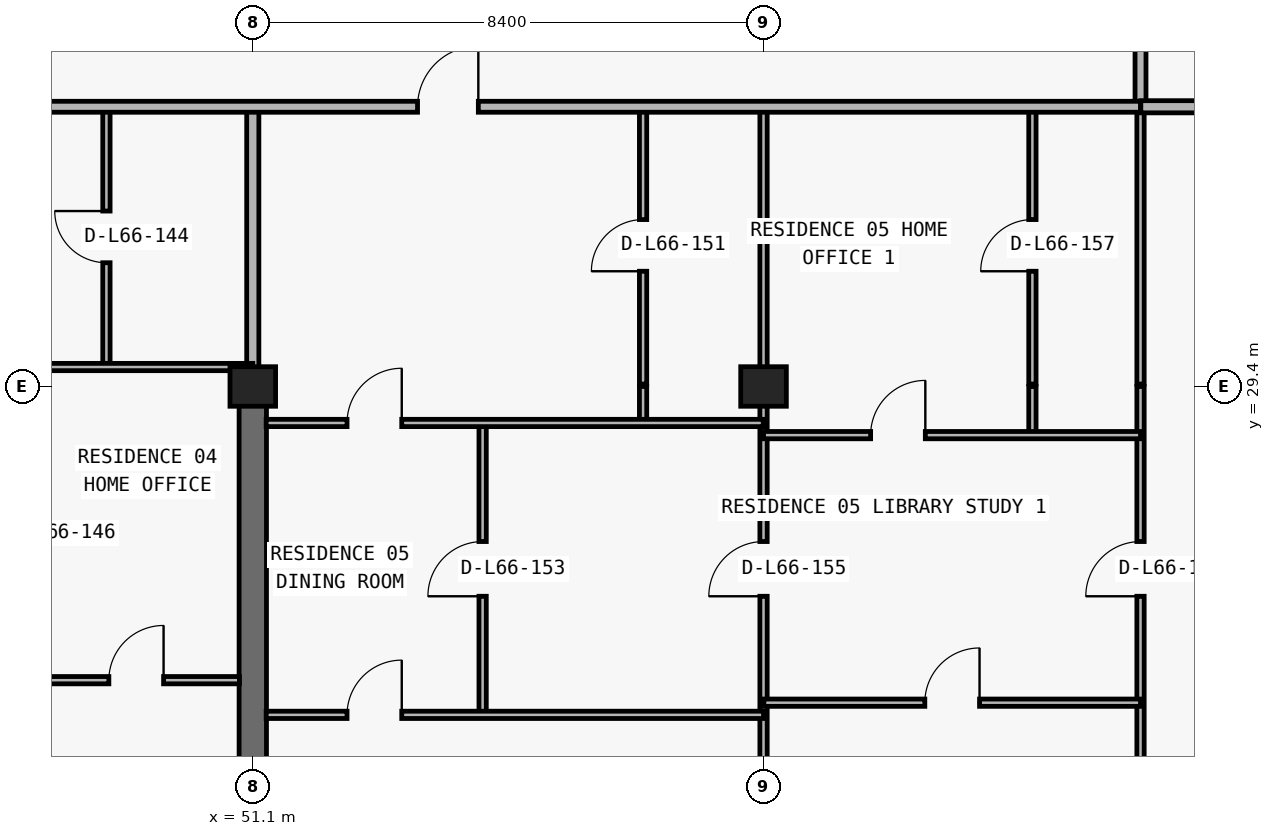
"""IFC4 building model, lengths in metres.
Left out: names, types, materials, properties, quantities, classifications, styles, units other than length and angle.
Written with IfcOpenShell. Run it as: python <this file> out.ifc"""

import sys

from ifc_helpers import new_model, si_unit, direction, frame, frame_2d, origin, origin_2d, place, context, subcontext, project, spatial, rectangle, extrude, element, fill, save


model = new_model("IFC4")
c1 = context("Model", 3, precision=1e-05, world=origin(), true_north=direction((0.0, 1.0)))
c2 = subcontext(c1, "Body", "Model", "MODEL_VIEW")
j1 = project(units=[si_unit("LENGTHUNIT", "METRE"), si_unit("PLANEANGLEUNIT", "RADIAN")], contexts=[c1])
p1 = place(None, origin())
s1 = spatial("IfcSite", under=j1, at=p1, CompositionType="ELEMENT")
p2 = place(p1, origin())
s2 = spatial("IfcBuilding", under=s1, at=p2, CompositionType="ELEMENT")
p3 = place(p2, frame((0.0, 0.0, 236.4)))
s3 = spatial("IfcBuildingStorey", under=s2, at=p3, CompositionType="ELEMENT", Elevation=236.4)
for number, where, z_axis, x_axis in (
    (1, (51.1, 29.4, 0.0), (0.0, 0.0, 1.0), (1.0, 0.0, 0.0)),
    (2, (59.5, 29.4, 0.0), (0.0, 0.0, 1.0), (1.0, 0.0, 0.0)),
):
    element("IfcColumn", number, at=place(p3, frame(where, z_axis=z_axis, x_axis=x_axis)), inside=s3, PredefinedType="COLUMN", context=c2, shape_type="SweptSolid", body=[
        extrude(rectangle(XDim=0.75, YDim=0.65, at=origin_2d()), origin(), (0.0, 0.0, 1.0), 3.05),
    ])
p4 = place(p3, frame((51.1, 20.8, 0.0), z_axis=(0.0, 0.0, 1.0), x_axis=(0.0, 1.0, 0.0)))
e3 = element("IfcWall", 3, at=p4, inside=s3, PredefinedType="SHEAR", context=c2, shape_type="SweptSolid", body=[
    extrude(rectangle(XDim=8.6, YDim=0.45, at=frame_2d((4.3, 0.0))), origin(), (0.0, 0.0, 1.0), 3.05),
])
p5 = place(p3, frame((48.693, 29.72, 0.0), z_axis=(0.0, 0.0, 1.0), x_axis=(0.0, 1.0, 0.0)))
e4 = element("IfcWall", 4, at=p5, inside=s3, PredefinedType="PARTITIONING", context=c2, shape_type="SweptSolid", body=[
    extrude(rectangle(XDim=4.28, YDim=0.12, at=frame_2d((2.14, 0.0))), origin(), (0.0, 0.0, 1.0), 3.05),
])
p6 = place(p5, frame((1.715, 0.0, 0.0)))
e5 = element("IfcOpeningElement", 5, at=p6, cuts=e4, PredefinedType="OPENING", context=c2, shape_type="SweptSolid", body=[
    extrude(rectangle(XDim=0.85, YDim=2.1, at=frame_2d((0.425, 1.05))), frame((0.0, 0.07, 0.0), z_axis=(0.0, -1.0, 0.0), x_axis=(1.0, 0.0, 0.0)), (0.0, 0.0, 1.0), 0.14),
])
p7 = place(p3, frame((51.1, 29.44, 0.0), z_axis=(0.0, 0.0, 1.0), x_axis=(0.0, 1.0, 0.0)))
e6 = element("IfcWall", 6, at=p7, inside=s3, PredefinedType="PARTITIONING", context=c2, shape_type="SweptSolid", body=[
    extrude(rectangle(XDim=4.56, YDim=0.2, at=frame_2d((2.28, 0.0))), origin(), (0.0, 0.0, 1.0), 2.335),
])
p8 = place(p3, frame((54.88, 24.0, 0.0), z_axis=(0.0, 0.0, 1.0), x_axis=(0.0, 1.0, 0.0)))
e7 = element("IfcWall", 7, at=p8, inside=s3, PredefinedType="PARTITIONING", context=c2, shape_type="SweptSolid", body=[
    extrude(rectangle(XDim=4.8, YDim=0.12, at=frame_2d((2.4, 0.0))), origin(), (0.0, 0.0, 1.0), 3.05),
])
p9 = place(p8, frame((1.95, 0.0, 0.0)))
e8 = element("IfcOpeningElement", 8, at=p9, cuts=e7, PredefinedType="OPENING", context=c2, shape_type="SweptSolid", body=[
    extrude(rectangle(XDim=0.9, YDim=2.15, at=frame_2d((0.45, 1.075))), frame((0.0, 0.07, 0.0), z_axis=(0.0, -1.0, 0.0), x_axis=(1.0, 0.0, 0.0)), (0.0, 0.0, 1.0), 0.14),
])
p10 = place(p3, frame((57.519, 28.8, 0.0), z_axis=(0.0, 0.0, 1.0), x_axis=(0.0, 1.0, 0.0)))
e9 = element("IfcWall", 9, at=p10, inside=s3, PredefinedType="PARTITIONING", context=c2, shape_type="SweptSolid", body=[
    extrude(rectangle(XDim=0.6, YDim=0.12, at=frame_2d((0.3, 0.0))), origin(), (0.0, 0.0, 1.0), 3.05),
])
p11 = place(p3, frame((57.519, 29.44, 0.0), z_axis=(0.0, 0.0, 1.0), x_axis=(0.0, 1.0, 0.0)))
e10 = element("IfcWall", 10, at=p11, inside=s3, PredefinedType="PARTITIONING", context=c2, shape_type="SweptSolid", body=[
    extrude(rectangle(XDim=4.56, YDim=0.12, at=frame_2d((2.28, 0.0))), origin(), (0.0, 0.0, 1.0), 3.05),
])
p12 = place(p11, frame((1.855, 0.0, 0.0)))
e11 = element("IfcOpeningElement", 11, at=p12, cuts=e10, PredefinedType="OPENING", context=c2, shape_type="SweptSolid", body=[
    extrude(rectangle(XDim=0.85, YDim=2.1, at=frame_2d((0.425, 1.05))), frame((0.0, 0.07, 0.0), z_axis=(0.0, -1.0, 0.0), x_axis=(1.0, 0.0, 0.0)), (0.0, 0.0, 1.0), 0.14),
])
p13 = place(p3, frame((59.5, 13.34, 0.0), z_axis=(0.0, 0.0, 1.0), x_axis=(0.0, 1.0, 0.0)))
e12 = element("IfcWall", 12, at=p13, inside=s3, PredefinedType="PARTITIONING", context=c2, shape_type="SweptSolid", body=[
    extrude(rectangle(XDim=16.06, YDim=0.12, at=frame_2d((8.03, 0.0))), origin(), (0.0, 0.0, 1.0), 2.263),
])
p14 = place(p13, frame((12.61, 0.0, 0.0)))
e13 = element("IfcOpeningElement", 13, at=p14, cuts=e12, PredefinedType="OPENING", context=c2, shape_type="SweptSolid", body=[
    extrude(rectangle(XDim=0.9, YDim=2.15, at=frame_2d((0.45, 1.075))), frame((0.0, 0.07, 0.0), z_axis=(0.0, -1.0, 0.0), x_axis=(1.0, 0.0, 0.0)), (0.0, 0.0, 1.0), 0.14),
])
p15 = place(p3, frame((59.5, 29.44, 0.0), z_axis=(0.0, 0.0, 1.0), x_axis=(0.0, 1.0, 0.0)))
e14 = element("IfcWall", 14, at=p15, inside=s3, PredefinedType="PARTITIONING", context=c2, shape_type="SweptSolid", body=[
    extrude(rectangle(XDim=4.56, YDim=0.12, at=frame_2d((2.28, 0.0))), origin(), (0.0, 0.0, 1.0), 2.263),
])
p16 = place(p3, frame((63.922, 28.6, 0.0), z_axis=(0.0, 0.0, 1.0), x_axis=(0.0, 1.0, 0.0)))
e15 = element("IfcWall", 15, at=p16, inside=s3, PredefinedType="PARTITIONING", context=c2, shape_type="SweptSolid", body=[
    extrude(rectangle(XDim=0.8, YDim=0.12, at=frame_2d((0.4, 0.0))), origin(), (0.0, 0.0, 1.0), 3.05),
])
p17 = place(p3, frame((63.922, 29.44, 0.0), z_axis=(0.0, 0.0, 1.0), x_axis=(0.0, 1.0, 0.0)))
e16 = element("IfcWall", 16, at=p17, inside=s3, PredefinedType="PARTITIONING", context=c2, shape_type="SweptSolid", body=[
    extrude(rectangle(XDim=4.56, YDim=0.12, at=frame_2d((2.28, 0.0))), origin(), (0.0, 0.0, 1.0), 3.05),
])
p18 = place(p17, frame((1.855, 0.0, 0.0)))
e17 = element("IfcOpeningElement", 17, at=p18, cuts=e16, PredefinedType="OPENING", context=c2, shape_type="SweptSolid", body=[
    extrude(rectangle(XDim=0.85, YDim=2.1, at=frame_2d((0.425, 1.05))), frame((0.0, 0.07, 0.0), z_axis=(0.0, -1.0, 0.0), x_axis=(1.0, 0.0, 0.0)), (0.0, 0.0, 1.0), 0.14),
])
p19 = place(p3, frame((65.7, 13.42, 0.0), z_axis=(0.0, 0.0, 1.0), x_axis=(0.0, 1.0, 0.0)))
e18 = element("IfcWall", 18, at=p19, inside=s3, PredefinedType="PARTITIONING", context=c2, shape_type="SweptSolid", body=[
    extrude(rectangle(XDim=15.98, YDim=0.12, at=frame_2d((7.99, 0.0))), origin(), (0.0, 0.0, 1.0), 2.629),
])
p20 = place(p19, frame((12.53, 0.0, 0.0)))
e19 = element("IfcOpeningElement", 19, at=p20, cuts=e18, PredefinedType="OPENING", context=c2, shape_type="SweptSolid", body=[
    extrude(rectangle(XDim=0.9, YDim=2.15, at=frame_2d((0.45, 1.075))), frame((0.0, 0.07, 0.0), z_axis=(0.0, -1.0, 0.0), x_axis=(1.0, 0.0, 0.0)), (0.0, 0.0, 1.0), 0.14),
])
p21 = place(p3, frame((65.7, 29.44, 0.0), z_axis=(0.0, 0.0, 1.0), x_axis=(0.0, 1.0, 0.0)))
e20 = element("IfcWall", 20, at=p21, inside=s3, PredefinedType="PARTITIONING", context=c2, shape_type="SweptSolid", body=[
    extrude(rectangle(XDim=4.56, YDim=0.12, at=frame_2d((2.28, 0.0))), origin(), (0.0, 0.0, 1.0), 2.629),
])
p22 = place(p3, frame((65.7, 34.005, 0.0), z_axis=(0.0, 0.0, 1.0), x_axis=(0.0, 1.0, 0.0)))
e21 = element("IfcWall", 21, at=p22, inside=s3, PredefinedType="PARTITIONING", context=c2, shape_type="SweptSolid", body=[
    extrude(rectangle(XDim=2.995, YDim=0.18, at=frame_2d((1.498, 0.0))), origin(), (0.0, 0.0, 1.0), 2.629),
])
p23 = place(p3, frame((51.32, 24.0, 0.0), z_axis=(0.0, 0.0, 1.0), x_axis=(1.0, 0.0, 0.0)))
e22 = element("IfcWall", 22, at=p23, inside=s3, PredefinedType="PARTITIONING", context=c2, shape_type="SweptSolid", body=[
    extrude(rectangle(XDim=8.18, YDim=0.12, at=frame_2d((4.09, 0.0))), origin(), (0.0, 0.0, 1.0), 3.05),
])
p24 = place(p23, frame((1.33, 0.0, 0.0)))
e23 = element("IfcOpeningElement", 23, at=p24, cuts=e22, PredefinedType="OPENING", context=c2, shape_type="SweptSolid", body=[
    extrude(rectangle(XDim=0.9, YDim=2.15, at=frame_2d((0.45, 1.075))), frame((0.0, 0.07, 0.0), z_axis=(0.0, -1.0, 0.0), x_axis=(1.0, 0.0, 0.0)), (0.0, 0.0, 1.0), 0.14),
])
p25 = place(p3, frame((59.505, 24.2, 0.0), z_axis=(0.0, 0.0, 1.0), x_axis=(1.0, 0.0, 0.0)))
e24 = element("IfcWall", 24, at=p25, inside=s3, PredefinedType="PARTITIONING", context=c2, shape_type="SweptSolid", body=[
    extrude(rectangle(XDim=6.195, YDim=0.12, at=frame_2d((3.098, 0.0))), origin(), (0.0, 0.0, 1.0), 3.05),
])
p26 = place(p25, frame((2.647, 0.0, 0.0)))
e25 = element("IfcOpeningElement", 25, at=p26, cuts=e24, PredefinedType="OPENING", context=c2, shape_type="SweptSolid", body=[
    extrude(rectangle(XDim=0.9, YDim=2.15, at=frame_2d((0.45, 1.075))), frame((0.0, 0.07, 0.0), z_axis=(0.0, -1.0, 0.0), x_axis=(1.0, 0.0, 0.0)), (0.0, 0.0, 1.0), 0.14),
])
p27 = place(p3, frame((42.7, 24.57, 0.0), z_axis=(0.0, 0.0, 1.0), x_axis=(1.0, 0.0, 0.0)))
e26 = element("IfcWall", 26, at=p27, inside=s3, PredefinedType="PARTITIONING", context=c2, shape_type="SweptSolid", body=[
    extrude(rectangle(XDim=8.18, YDim=0.12, at=frame_2d((4.09, 0.0))), origin(), (0.0, 0.0, 1.0), 3.05),
])
p28 = place(p27, frame((1.86, 0.0, 0.0)))
e27 = element("IfcOpeningElement", 27, at=p28, cuts=e26, PredefinedType="OPENING", context=c2, shape_type="SweptSolid", body=[
    extrude(rectangle(XDim=0.9, YDim=2.15, at=frame_2d((0.45, 1.075))), frame((0.0, 0.07, 0.0), z_axis=(0.0, -1.0, 0.0), x_axis=(1.0, 0.0, 0.0)), (0.0, 0.0, 1.0), 0.14),
])
p29 = place(p27, frame((6.033, 0.0, 0.0)))
e28 = element("IfcOpeningElement", 28, at=p29, cuts=e26, PredefinedType="OPENING", context=c2, shape_type="SweptSolid", body=[
    extrude(rectangle(XDim=0.9, YDim=2.15, at=frame_2d((0.45, 1.075))), frame((0.0, 0.07, 0.0), z_axis=(0.0, -1.0, 0.0), x_axis=(1.0, 0.0, 0.0)), (0.0, 0.0, 1.0), 0.14),
])
p30 = place(p3, frame((59.5, 28.6, 0.0), z_axis=(0.0, 0.0, 1.0), x_axis=(1.0, 0.0, 0.0)))
e29 = element("IfcWall", 29, at=p30, inside=s3, PredefinedType="PARTITIONING", context=c2, shape_type="SweptSolid", body=[
    extrude(rectangle(XDim=6.2, YDim=0.12, at=frame_2d((3.1, 0.0))), origin(), (0.0, 0.0, 1.0), 3.05),
])
p31 = place(p30, frame((1.761, 0.0, 0.0)))
e30 = element("IfcOpeningElement", 30, at=p31, cuts=e29, PredefinedType="OPENING", context=c2, shape_type="SweptSolid", body=[
    extrude(rectangle(XDim=0.9, YDim=2.15, at=frame_2d((0.45, 1.075))), frame((0.0, 0.07, 0.0), z_axis=(0.0, -1.0, 0.0), x_axis=(1.0, 0.0, 0.0)), (0.0, 0.0, 1.0), 0.14),
])
p32 = place(p3, frame((51.32, 28.8, 0.0), z_axis=(0.0, 0.0, 1.0), x_axis=(1.0, 0.0, 0.0)))
e31 = element("IfcWall", 31, at=p32, inside=s3, PredefinedType="PARTITIONING", context=c2, shape_type="SweptSolid", body=[
    extrude(rectangle(XDim=8.175, YDim=0.12, at=frame_2d((4.087, 0.0))), origin(), (0.0, 0.0, 1.0), 3.05),
])
p33 = place(p32, frame((1.33, 0.0, 0.0)))
e32 = element("IfcOpeningElement", 32, at=p33, cuts=e31, PredefinedType="OPENING", context=c2, shape_type="SweptSolid", body=[
    extrude(rectangle(XDim=0.9, YDim=2.15, at=frame_2d((0.45, 1.075))), frame((0.0, 0.07, 0.0), z_axis=(0.0, -1.0, 0.0), x_axis=(1.0, 0.0, 0.0)), (0.0, 0.0, 1.0), 0.14),
])
p34 = place(p3, frame((42.7, 29.72, 0.0), z_axis=(0.0, 0.0, 1.0), x_axis=(1.0, 0.0, 0.0)))
e33 = element("IfcWall", 33, at=p34, inside=s3, PredefinedType="PARTITIONING", context=c2, shape_type="SweptSolid", body=[
    extrude(rectangle(XDim=8.4, YDim=0.12, at=frame_2d((4.2, 0.0))), origin(), (0.0, 0.0, 1.0), 2.263),
])
p35 = place(p34, frame((1.943, 0.0, 0.0)))
e34 = element("IfcOpeningElement", 34, at=p35, cuts=e33, PredefinedType="OPENING", context=c2, shape_type="SweptSolid", body=[
    extrude(rectangle(XDim=0.9, YDim=2.15, at=frame_2d((0.45, 1.075))), frame((0.0, 0.07, 0.0), z_axis=(0.0, -1.0, 0.0), x_axis=(1.0, 0.0, 0.0)), (0.0, 0.0, 1.0), 0.14),
])
p36 = place(p3, frame((12.105, 34.0, 0.0), z_axis=(0.0, 0.0, 1.0), x_axis=(1.0, 0.0, 0.0)))
e35 = element("IfcWall", 35, at=p36, inside=s3, PredefinedType="PARTITIONING", context=c2, shape_type="SweptSolid", body=[
    extrude(rectangle(XDim=53.595, YDim=0.18, at=frame_2d((26.797, 0.0))), origin(), (0.0, 0.0, 1.0), 3.05),
])
p37 = place(p36, frame((1.607, 0.0, 0.0)))
e36 = element("IfcOpeningElement", 36, at=p37, cuts=e35, PredefinedType="OPENING", context=c2, shape_type="SweptSolid", body=[
    extrude(rectangle(XDim=1.0, YDim=2.2, at=frame_2d((0.5, 1.1))), frame((0.0, 0.1, 0.0), z_axis=(0.0, -1.0, 0.0), x_axis=(1.0, 0.0, 0.0)), (0.0, 0.0, 1.0), 0.2),
])
p38 = place(p36, frame((17.057, 0.0, 0.0)))
e37 = element("IfcOpeningElement", 37, at=p38, cuts=e35, PredefinedType="OPENING", context=c2, shape_type="SweptSolid", body=[
    extrude(rectangle(XDim=1.0, YDim=2.2, at=frame_2d((0.5, 1.1))), frame((0.0, 0.1, 0.0), z_axis=(0.0, -1.0, 0.0), x_axis=(1.0, 0.0, 0.0)), (0.0, 0.0, 1.0), 0.2),
])
p39 = place(p36, frame((25.242, 0.0, 0.0)))
e38 = element("IfcOpeningElement", 38, at=p39, cuts=e35, PredefinedType="OPENING", context=c2, shape_type="SweptSolid", body=[
    extrude(rectangle(XDim=1.0, YDim=2.2, at=frame_2d((0.5, 1.1))), frame((0.0, 0.1, 0.0), z_axis=(0.0, -1.0, 0.0), x_axis=(1.0, 0.0, 0.0)), (0.0, 0.0, 1.0), 0.2),
])
p40 = place(p36, frame((33.092, 0.0, 0.0)))
e39 = element("IfcOpeningElement", 39, at=p40, cuts=e35, PredefinedType="OPENING", context=c2, shape_type="SweptSolid", body=[
    extrude(rectangle(XDim=1.0, YDim=2.2, at=frame_2d((0.5, 1.1))), frame((0.0, 0.1, 0.0), z_axis=(0.0, -1.0, 0.0), x_axis=(1.0, 0.0, 0.0)), (0.0, 0.0, 1.0), 0.2),
])
p41 = place(p36, frame((41.705, 0.0, 0.0)))
e40 = element("IfcOpeningElement", 40, at=p41, cuts=e35, PredefinedType="OPENING", context=c2, shape_type="SweptSolid", body=[
    extrude(rectangle(XDim=1.0, YDim=2.2, at=frame_2d((0.5, 1.1))), frame((0.0, 0.1, 0.0), z_axis=(0.0, -1.0, 0.0), x_axis=(1.0, 0.0, 0.0)), (0.0, 0.0, 1.0), 0.2),
])
p42 = place(p3, frame((65.705, 34.0, 0.0), z_axis=(0.0, 0.0, 1.0), x_axis=(1.0, 0.0, 0.0)))
e41 = element("IfcWall", 41, at=p42, inside=s3, PredefinedType="PARTITIONING", context=c2, shape_type="SweptSolid", body=[
    extrude(rectangle(XDim=3.7, YDim=0.2, at=frame_2d((1.85, 0.0))), origin(), (0.0, 0.0, 1.0), 3.05),
])
p43 = place(p6, origin())
e42 = element("IfcDoor", 42, at=p43, inside=s3, OperationType="SINGLE_SWING_RIGHT", PredefinedType="DOOR", context=c2, shape_type="SweptSolid", body=[
    extrude(rectangle(XDim=0.85, YDim=2.1, at=frame_2d((0.425, 1.05))), frame((0.0, 0.025, 0.0), z_axis=(0.0, -1.0, 0.0), x_axis=(1.0, 0.0, 0.0)), (0.0, 0.0, 1.0), 0.05),
])
fill(e5, e42)
p44 = place(p29, origin())
e43 = element("IfcDoor", 43, at=p44, inside=s3, OperationType="SINGLE_SWING_RIGHT", PredefinedType="DOOR", context=c2, shape_type="SweptSolid", body=[
    extrude(rectangle(XDim=0.9, YDim=2.15, at=frame_2d((0.45, 1.075))), frame((0.0, 0.025, 0.0), z_axis=(0.0, -1.0, 0.0), x_axis=(1.0, 0.0, 0.0)), (0.0, 0.0, 1.0), 0.05),
])
fill(e28, e43)
p45 = place(p41, origin())
e44 = element("IfcDoor", 44, at=p45, inside=s3, OperationType="SINGLE_SWING_RIGHT", PredefinedType="DOOR", context=c2, shape_type="SweptSolid", body=[
    extrude(rectangle(XDim=1.0, YDim=2.2, at=frame_2d((0.5, 1.1))), frame((0.0, 0.025, 0.0), z_axis=(0.0, -1.0, 0.0), x_axis=(1.0, 0.0, 0.0)), (0.0, 0.0, 1.0), 0.05),
])
fill(e40, e44)
p46 = place(p12, origin())
e45 = element("IfcDoor", 45, at=p46, inside=s3, OperationType="SINGLE_SWING_LEFT", PredefinedType="DOOR", context=c2, shape_type="SweptSolid", body=[
    extrude(rectangle(XDim=0.85, YDim=2.1, at=frame_2d((0.425, 1.05))), frame((0.0, 0.025, 0.0), z_axis=(0.0, -1.0, 0.0), x_axis=(1.0, 0.0, 0.0)), (0.0, 0.0, 1.0), 0.05),
])
fill(e11, e45)
p47 = place(p33, origin())
e46 = element("IfcDoor", 46, at=p47, inside=s3, OperationType="SINGLE_SWING_RIGHT", PredefinedType="DOOR", context=c2, shape_type="SweptSolid", body=[
    extrude(rectangle(XDim=0.9, YDim=2.15, at=frame_2d((0.45, 1.075))), frame((0.0, 0.025, 0.0), z_axis=(0.0, -1.0, 0.0), x_axis=(1.0, 0.0, 0.0)), (0.0, 0.0, 1.0), 0.05),
])
fill(e32, e46)
p48 = place(p9, origin())
e47 = element("IfcDoor", 47, at=p48, inside=s3, OperationType="SINGLE_SWING_LEFT", PredefinedType="DOOR", context=c2, shape_type="SweptSolid", body=[
    extrude(rectangle(XDim=0.9, YDim=2.15, at=frame_2d((0.45, 1.075))), frame((0.0, 0.025, 0.0), z_axis=(0.0, -1.0, 0.0), x_axis=(1.0, 0.0, 0.0)), (0.0, 0.0, 1.0), 0.05),
])
fill(e8, e47)
p49 = place(p24, origin())
e48 = element("IfcDoor", 48, at=p49, inside=s3, OperationType="SINGLE_SWING_RIGHT", PredefinedType="DOOR", context=c2, shape_type="SweptSolid", body=[
    extrude(rectangle(XDim=0.9, YDim=2.15, at=frame_2d((0.45, 1.075))), frame((0.0, 0.025, 0.0), z_axis=(0.0, -1.0, 0.0), x_axis=(1.0, 0.0, 0.0)), (0.0, 0.0, 1.0), 0.05),
])
fill(e23, e48)
p50 = place(p14, origin())
e49 = element("IfcDoor", 49, at=p50, inside=s3, OperationType="SINGLE_SWING_LEFT", PredefinedType="DOOR", context=c2, shape_type="SweptSolid", body=[
    extrude(rectangle(XDim=0.9, YDim=2.15, at=frame_2d((0.45, 1.075))), frame((0.0, 0.025, 0.0), z_axis=(0.0, -1.0, 0.0), x_axis=(1.0, 0.0, 0.0)), (0.0, 0.0, 1.0), 0.05),
])
fill(e13, e49)
p51 = place(p31, origin())
e50 = element("IfcDoor", 50, at=p51, inside=s3, OperationType="SINGLE_SWING_RIGHT", PredefinedType="DOOR", context=c2, shape_type="SweptSolid", body=[
    extrude(rectangle(XDim=0.9, YDim=2.15, at=frame_2d((0.45, 1.075))), frame((0.0, 0.025, 0.0), z_axis=(0.0, -1.0, 0.0), x_axis=(1.0, 0.0, 0.0)), (0.0, 0.0, 1.0), 0.05),
])
fill(e30, e50)
p52 = place(p18, origin())
e51 = element("IfcDoor", 51, at=p52, inside=s3, OperationType="SINGLE_SWING_LEFT", PredefinedType="DOOR", context=c2, shape_type="SweptSolid", body=[
    extrude(rectangle(XDim=0.85, YDim=2.1, at=frame_2d((0.425, 1.05))), frame((0.0, 0.025, 0.0), z_axis=(0.0, -1.0, 0.0), x_axis=(1.0, 0.0, 0.0)), (0.0, 0.0, 1.0), 0.05),
])
fill(e17, e51)
p53 = place(p26, origin())
e52 = element("IfcDoor", 52, at=p53, inside=s3, OperationType="SINGLE_SWING_RIGHT", PredefinedType="DOOR", context=c2, shape_type="SweptSolid", body=[
    extrude(rectangle(XDim=0.9, YDim=2.15, at=frame_2d((0.45, 1.075))), frame((0.0, 0.025, 0.0), z_axis=(0.0, -1.0, 0.0), x_axis=(1.0, 0.0, 0.0)), (0.0, 0.0, 1.0), 0.05),
])
fill(e25, e52)
p54 = place(p20, origin())
e53 = element("IfcDoor", 53, at=p54, inside=s3, OperationType="SINGLE_SWING_LEFT", PredefinedType="DOOR", context=c2, shape_type="SweptSolid", body=[
    extrude(rectangle(XDim=0.9, YDim=2.15, at=frame_2d((0.45, 1.075))), frame((0.0, 0.025, 0.0), z_axis=(0.0, -1.0, 0.0), x_axis=(1.0, 0.0, 0.0)), (0.0, 0.0, 1.0), 0.05),
])
fill(e19, e53)
save(model, sys.argv[1])
